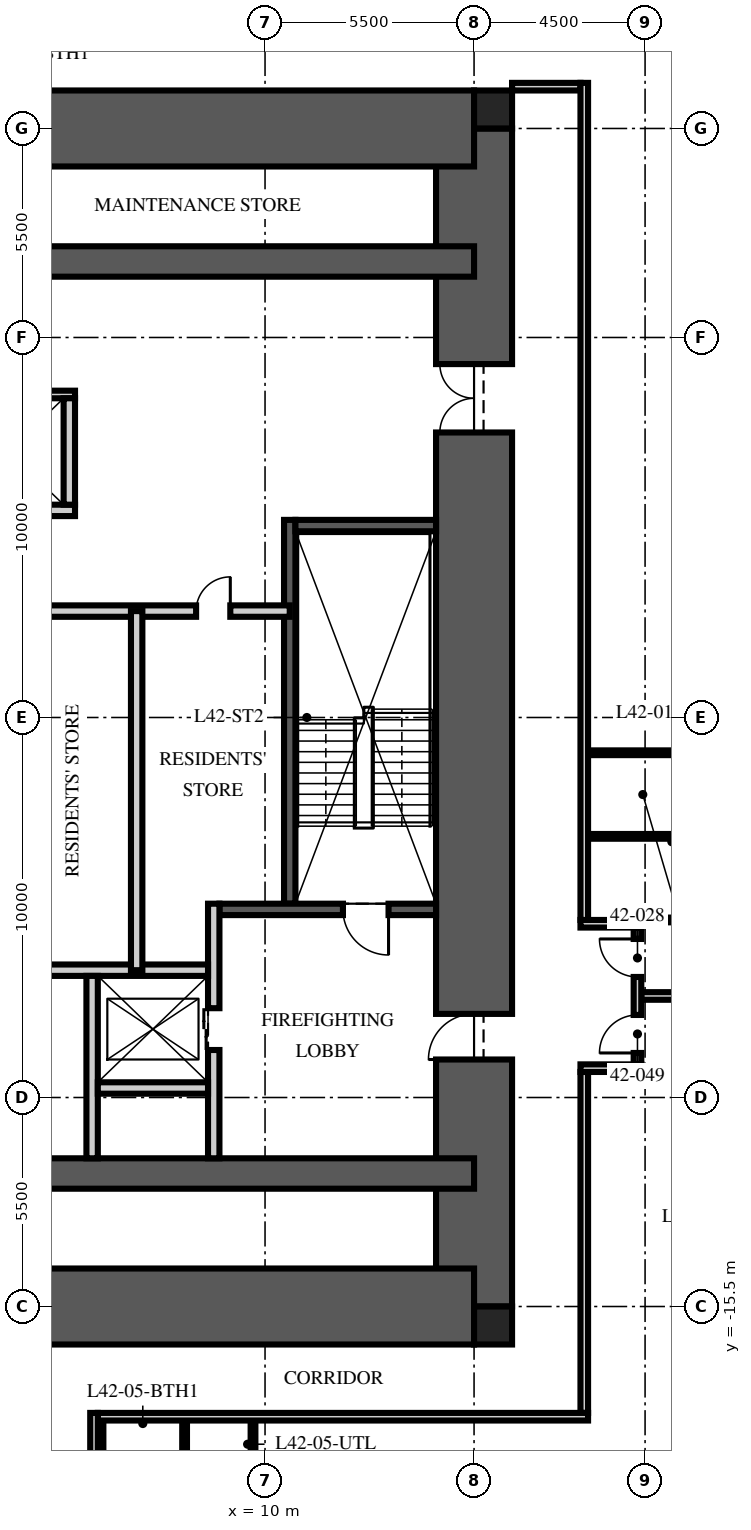
"""IFC4 building model, lengths in metres.
Left out: names, types, materials, properties, quantities, classifications, styles, units other than length and angle.
Written with IfcOpenShell. Run it as: python <this file> out.ifc"""

import sys

from ifc_helpers import new_model, si_unit, direction, frame, frame_2d, origin, origin_2d, place, context, subcontext, project, spatial, rectangle, extrude, element, fill, save


model = new_model("IFC4")
c1 = context("Model", 3, precision=1e-05, world=origin(), true_north=direction((0.0, 1.0)))
c2 = subcontext(c1, "Body", "Model", "MODEL_VIEW")
j1 = project(units=[si_unit("LENGTHUNIT", "METRE"), si_unit("PLANEANGLEUNIT", "RADIAN")], contexts=[c1])
p1 = place(None, origin())
s1 = spatial("IfcSite", under=j1, at=p1, CompositionType="ELEMENT")
p2 = place(p1, origin())
s2 = spatial("IfcBuilding", under=s1, at=p2, CompositionType="ELEMENT")
p3 = place(p2, frame((0.0, 0.0, 167.25)))
s3 = spatial("IfcBuildingStorey", under=s2, at=p3, CompositionType="ELEMENT", Elevation=167.25)
p4 = place(p3, frame((15.5, -15.5, -0.25), z_axis=(0.0, 0.0, 1.0), x_axis=(0.0, 1.0, 0.0)))
e1 = element("IfcWall", 1, at=p4, inside=s3, PredefinedType="SHEAR", context=c2, shape_type="SweptSolid", body=[
    extrude(rectangle(XDim=31.0, YDim=2.0, at=frame_2d((15.5, 0.0))), origin(), (0.0, 0.0, 1.0), 3.75),
])
p5 = place(p4, frame((6.5, 0.0, 0.25)))
e2 = element("IfcOpeningElement", 2, at=p5, cuts=e1, PredefinedType="OPENING", context=c2, shape_type="SweptSolid", body=[
    extrude(rectangle(XDim=1.2, YDim=2.1, at=frame_2d((0.6, 1.05))), frame((0.0, 1.01, 0.0), z_axis=(0.0, -1.0, 0.0), x_axis=(1.0, 0.0, 0.0)), (0.0, 0.0, 1.0), 2.02),
])
p6 = place(p4, frame((23.0, 0.0, 0.25)))
e3 = element("IfcOpeningElement", 3, at=p6, cuts=e1, PredefinedType="OPENING", context=c2, shape_type="SweptSolid", body=[
    extrude(rectangle(XDim=1.8, YDim=2.1, at=frame_2d((0.9, 1.05))), frame((0.0, 1.01, 0.0), z_axis=(0.0, -1.0, 0.0), x_axis=(1.0, 0.0, 0.0)), (0.0, 0.0, 1.0), 2.02),
])
p7 = place(p3, frame((-15.5, 15.5, -0.25), z_axis=(0.0, 0.0, 1.0), x_axis=(1.0, 0.0, 0.0)))
e4 = element("IfcWall", 4, at=p7, inside=s3, PredefinedType="SHEAR", context=c2, shape_type="SweptSolid", body=[
    extrude(rectangle(XDim=31.0, YDim=2.0, at=frame_2d((15.5, 0.0))), origin(), (0.0, 0.0, 1.0), 3.75),
])
p8 = place(p7, frame((5.0, 0.0, 0.25)))
e5 = element("IfcOpeningElement", 5, at=p8, cuts=e4, PredefinedType="OPENING", context=c2, shape_type="SweptSolid", body=[
    extrude(rectangle(XDim=1.0, YDim=2.1, at=frame_2d((0.5, 1.05))), frame((0.0, 1.01, 0.0), z_axis=(0.0, -1.0, 0.0), x_axis=(1.0, 0.0, 0.0)), (0.0, 0.0, 1.0), 2.02),
])
p9 = place(p3, frame((-15.5, -15.5, -0.25), z_axis=(0.0, 0.0, 1.0), x_axis=(1.0, 0.0, 0.0)))
e6 = element("IfcWall", 6, at=p9, inside=s3, PredefinedType="SHEAR", context=c2, shape_type="SweptSolid", body=[
    extrude(rectangle(XDim=31.0, YDim=2.0, at=frame_2d((15.5, 0.0))), origin(), (0.0, 0.0, 1.0), 3.75),
])
p10 = place(p9, frame((10.4, 0.0, 0.25)))
e7 = element("IfcOpeningElement", 7, at=p10, cuts=e6, PredefinedType="OPENING", context=c2, shape_type="SweptSolid", body=[
    extrude(rectangle(XDim=1.1, YDim=2.1, at=frame_2d((0.55, 1.05))), frame((0.0, 1.01, 0.0), z_axis=(0.0, -1.0, 0.0), x_axis=(1.0, 0.0, 0.0)), (0.0, 0.0, 1.0), 2.02),
])
p11 = place(p9, frame((13.5, 0.0, 0.25)))
e8 = element("IfcOpeningElement", 8, at=p11, cuts=e6, PredefinedType="OPENING", context=c2, shape_type="SweptSolid", body=[
    extrude(rectangle(XDim=1.1, YDim=2.1, at=frame_2d((0.55, 1.05))), frame((0.0, 1.01, 0.0), z_axis=(0.0, -1.0, 0.0), x_axis=(1.0, 0.0, 0.0)), (0.0, 0.0, 1.0), 2.02),
])
p12 = place(p9, frame((16.6, 0.0, 0.25)))
e9 = element("IfcOpeningElement", 9, at=p12, cuts=e6, PredefinedType="OPENING", context=c2, shape_type="SweptSolid", body=[
    extrude(rectangle(XDim=1.1, YDim=2.1, at=frame_2d((0.55, 1.05))), frame((0.0, 1.01, 0.0), z_axis=(0.0, -1.0, 0.0), x_axis=(1.0, 0.0, 0.0)), (0.0, 0.0, 1.0), 2.02),
])
for number, where, z_axis, x_axis in (
    (10, (-15.5, 12.0, -0.25), (0.0, 0.0, 1.0), (1.0, 0.0, 0.0)),
    (11, (-15.5, -12.0, -0.25), (0.0, 0.0, 1.0), (1.0, 0.0, 0.0)),
):
    element("IfcWall", number, at=place(p3, frame(where, z_axis=z_axis, x_axis=x_axis)), inside=s3, PredefinedType="SHEAR", context=c2, shape_type="SweptSolid", body=[
        extrude(rectangle(XDim=31.0, YDim=0.8, at=frame_2d((15.5, 0.0))), origin(), (0.0, 0.0, 1.0), 3.75),
    ])
for number, where, z_axis, x_axis in (
    (12, (16.0, 16.0, -0.25), (0.0, 0.0, 1.0), (1.0, 0.0, 0.0)),
    (13, (16.0, -16.0, -0.25), (0.0, 0.0, 1.0), (1.0, 0.0, 0.0)),
):
    element("IfcColumn", number, at=place(p3, frame(where, z_axis=z_axis, x_axis=x_axis)), inside=s3, PredefinedType="COLUMN", context=c2, shape_type="SweptSolid", body=[
        extrude(rectangle(XDim=1.0, YDim=1.0, at=origin_2d()), origin(), (0.0, 0.0, 1.0), 3.75),
    ])
p13 = place(p3, frame((10.65, -4.9, 0.0), z_axis=(0.0, 0.0, 1.0), x_axis=(0.0, 1.0, 0.0)))
e14 = element("IfcWall", 14, at=p13, inside=s3, PredefinedType="SOLIDWALL", context=c2, shape_type="SweptSolid", body=[
    extrude(rectangle(XDim=10.1, YDim=0.3, at=frame_2d((5.05, 0.0))), origin(), (0.0, 0.0, 1.0), 3.5),
])
p14 = place(p3, frame((14.5, -5.05, 0.0), z_axis=(0.0, 0.0, 1.0), x_axis=(-1.0, 0.0, 0.0)))
e15 = element("IfcWall", 15, at=p14, inside=s3, PredefinedType="SOLIDWALL", context=c2, shape_type="SweptSolid", body=[
    extrude(rectangle(XDim=5.7, YDim=0.3, at=frame_2d((2.85, 0.0))), origin(), (0.0, 0.0, 1.0), 3.5),
])
p15 = place(p14, frame((1.25, 0.0, 0.0)))
e16 = element("IfcOpeningElement", 16, at=p15, cuts=e15, PredefinedType="OPENING", context=c2, shape_type="SweptSolid", body=[
    extrude(rectangle(XDim=1.2, YDim=2.1, at=frame_2d((0.6, 1.05))), frame((0.0, 0.16, 0.0), z_axis=(0.0, -1.0, 0.0), x_axis=(1.0, 0.0, 0.0)), (0.0, 0.0, 1.0), 0.32),
])
p16 = place(p3, frame((14.5, 5.05, 0.0), z_axis=(0.0, 0.0, 1.0), x_axis=(-1.0, 0.0, 0.0)))
e17 = element("IfcWall", 17, at=p16, inside=s3, PredefinedType="SOLIDWALL", context=c2, shape_type="SweptSolid", body=[
    extrude(rectangle(XDim=3.7, YDim=0.3, at=frame_2d((1.85, 0.0))), origin(), (0.0, 0.0, 1.0), 3.5),
])
p17 = place(p3, frame((8.65, -11.6, 0.0), z_axis=(0.0, 0.0, 1.0), x_axis=(0.0, 1.0, 0.0)))
e18 = element("IfcWall", 18, at=p17, inside=s3, PredefinedType="PARTITIONING", context=c2, shape_type="SweptSolid", body=[
    extrude(rectangle(XDim=6.7, YDim=0.3, at=frame_2d((3.35, 0.0))), origin(), (0.0, 0.0, 1.0), 3.5),
])
p18 = place(p17, frame((2.85, 0.0, 0.0)))
e19 = element("IfcOpeningElement", 19, at=p18, cuts=e18, PredefinedType="OPENING", context=c2, shape_type="SweptSolid", body=[
    extrude(rectangle(XDim=1.1, YDim=2.1, at=frame_2d((0.55, 1.05))), frame((0.0, 0.16, 0.0), z_axis=(0.0, -1.0, 0.0), x_axis=(1.0, 0.0, 0.0)), (0.0, 0.0, 1.0), 0.32),
])
p19 = place(p3, frame((-8.5, -6.65, 0.0), z_axis=(0.0, 0.0, 1.0), x_axis=(1.0, 0.0, 0.0)))
e20 = element("IfcWall", 20, at=p19, inside=s3, PredefinedType="PARTITIONING", context=c2, shape_type="SweptSolid", body=[
    extrude(rectangle(XDim=17.0, YDim=0.3, at=frame_2d((8.5, 0.0))), origin(), (0.0, 0.0, 1.0), 3.5),
])
p20 = place(p19, frame((7.8, 0.0, 0.0)))
e21 = element("IfcOpeningElement", 21, at=p20, cuts=e20, PredefinedType="OPENING", context=c2, shape_type="SweptSolid", body=[
    extrude(rectangle(XDim=1.3, YDim=2.4, at=frame_2d((0.65, 1.2))), frame((0.0, 0.16, 0.0), z_axis=(0.0, -1.0, 0.0), x_axis=(1.0, 0.0, 0.0)), (0.0, 0.0, 1.0), 0.32),
])
p21 = place(p19, frame((5.65, 0.0, 0.0)))
e22 = element("IfcOpeningElement", 22, at=p21, cuts=e20, PredefinedType="OPENING", context=c2, shape_type="SweptSolid", body=[
    extrude(rectangle(XDim=0.9, YDim=2.1, at=frame_2d((0.45, 1.05))), frame((0.0, 0.16, 0.0), z_axis=(0.0, -1.0, 0.0), x_axis=(1.0, 0.0, 0.0)), (0.0, 0.0, 1.0), 0.32),
])
p22 = place(p19, frame((10.4, 0.0, 0.0)))
e23 = element("IfcOpeningElement", 23, at=p22, cuts=e20, PredefinedType="OPENING", context=c2, shape_type="SweptSolid", body=[
    extrude(rectangle(XDim=0.9, YDim=2.1, at=frame_2d((0.45, 1.05))), frame((0.0, 0.16, 0.0), z_axis=(0.0, -1.0, 0.0), x_axis=(1.0, 0.0, 0.0)), (0.0, 0.0, 1.0), 0.32),
])
p23 = place(p3, frame((5.45, -11.6, 0.0), z_axis=(0.0, 0.0, 1.0), x_axis=(0.0, 1.0, 0.0)))
e24 = element("IfcWall", 24, at=p23, inside=s3, PredefinedType="PARTITIONING", context=c2, shape_type="SweptSolid", body=[
    extrude(rectangle(XDim=4.8, YDim=0.3, at=frame_2d((2.4, 0.0))), origin(), (0.0, 0.0, 1.0), 3.5),
])
p24 = place(p3, frame((5.6, -9.75, 0.0), z_axis=(0.0, 0.0, 1.0), x_axis=(1.0, 0.0, 0.0)))
e25 = element("IfcWall", 25, at=p24, inside=s3, PredefinedType="PARTITIONING", context=c2, shape_type="SweptSolid", body=[
    extrude(rectangle(XDim=2.9, YDim=0.3, at=frame_2d((1.45, 0.0))), origin(), (0.0, 0.0, 1.0), 3.5),
])
p25 = place(p3, frame((-4.7, 5.45, 0.0), z_axis=(0.0, 0.0, 1.0), x_axis=(1.0, 0.0, 0.0)))
e26 = element("IfcWall", 26, at=p25, inside=s3, PredefinedType="PARTITIONING", context=c2, shape_type="SweptSolid", body=[
    extrude(rectangle(XDim=9.7, YDim=0.3, at=frame_2d((4.85, 0.0))), origin(), (0.0, 0.0, 1.0), 3.5),
])
p26 = place(p3, frame((-4.7, 8.5, 0.0), z_axis=(0.0, 0.0, 1.0), x_axis=(1.0, 0.0, 0.0)))
e27 = element("IfcWall", 27, at=p26, inside=s3, PredefinedType="PARTITIONING", context=c2, shape_type="SweptSolid", body=[
    extrude(rectangle(XDim=9.7, YDim=0.2, at=frame_2d((4.85, 0.0))), origin(), (0.0, 0.0, 1.0), 3.5),
])
p27 = place(p3, frame((4.85, 5.6, 0.0), z_axis=(0.0, 0.0, 1.0), x_axis=(0.0, 1.0, 0.0)))
e28 = element("IfcWall", 28, at=p27, inside=s3, PredefinedType="PARTITIONING", context=c2, shape_type="SweptSolid", body=[
    extrude(rectangle(XDim=2.8, YDim=0.3, at=frame_2d((1.4, 0.0))), origin(), (0.0, 0.0, 1.0), 3.5),
])
p28 = place(p3, frame((-10.65, 2.8, 0.0), z_axis=(0.0, 0.0, 1.0), x_axis=(1.0, 0.0, 0.0)))
e29 = element("IfcWall", 29, at=p28, inside=s3, PredefinedType="PARTITIONING", context=c2, shape_type="SweptSolid", body=[
    extrude(rectangle(XDim=21.3, YDim=0.3, at=frame_2d((10.65, 0.0))), origin(), (0.0, 0.0, 1.0), 3.5),
])
p29 = place(p28, frame((10.05, 0.0, 0.0)))
e30 = element("IfcOpeningElement", 30, at=p29, cuts=e29, PredefinedType="OPENING", context=c2, shape_type="SweptSolid", body=[
    extrude(rectangle(XDim=1.2, YDim=2.1, at=frame_2d((0.6, 1.05))), frame((0.0, 0.16, 0.0), z_axis=(0.0, -1.0, 0.0), x_axis=(1.0, 0.0, 0.0)), (0.0, 0.0, 1.0), 0.32),
])
p30 = place(p28, frame((1.493, 0.0, 0.0)))
e31 = element("IfcOpeningElement", 31, at=p30, cuts=e29, PredefinedType="OPENING", context=c2, shape_type="SweptSolid", body=[
    extrude(rectangle(XDim=0.9, YDim=2.1, at=frame_2d((0.45, 1.05))), frame((0.0, 0.16, 0.0), z_axis=(0.0, -1.0, 0.0), x_axis=(1.0, 0.0, 0.0)), (0.0, 0.0, 1.0), 0.32),
])
p31 = place(p28, frame((18.836, 0.0, 0.0)))
e32 = element("IfcOpeningElement", 32, at=p31, cuts=e29, PredefinedType="OPENING", context=c2, shape_type="SweptSolid", body=[
    extrude(rectangle(XDim=0.9, YDim=2.1, at=frame_2d((0.45, 1.05))), frame((0.0, 0.16, 0.0), z_axis=(0.0, -1.0, 0.0), x_axis=(1.0, 0.0, 0.0)), (0.0, 0.0, 1.0), 0.32),
])
p32 = place(p3, frame((6.622, -6.65, 0.0), z_axis=(0.0, 0.0, 1.0), x_axis=(0.0, 1.0, 0.0)))
e33 = element("IfcWall", 33, at=p32, inside=s3, PredefinedType="PARTITIONING", context=c2, shape_type="SweptSolid", body=[
    extrude(rectangle(XDim=9.45, YDim=0.3, at=frame_2d((4.725, 0.0))), origin(), (0.0, 0.0, 1.0), 3.5),
])
p33 = place(p3, frame((16.5, 16.6, 0.0), z_axis=(0.0, 0.0, 1.0), x_axis=(1.0, 0.0, 0.0)))
e34 = element("IfcWall", 34, at=p33, inside=s3, PredefinedType="PARTITIONING", context=c2, shape_type="SweptSolid", body=[
    extrude(rectangle(XDim=1.8, YDim=0.2, at=frame_2d((0.9, 0.0))), origin(), (0.0, 0.0, 1.0), 2.3),
])
p34 = place(p3, frame((19.9, -7.328, 0.0), z_axis=(0.0, 0.0, 1.0), x_axis=(1.0, 0.0, 0.0)))
e35 = element("IfcWall", 35, at=p34, inside=s3, PredefinedType="PARTITIONING", context=c2, shape_type="SweptSolid", body=[
    extrude(rectangle(XDim=8.5, YDim=0.2, at=frame_2d((4.25, 0.0))), origin(), (0.0, 0.0, 1.0), 2.81),
])
p35 = place(p3, frame((19.97, -5.328, 0.0), z_axis=(0.0, 0.0, 1.0), x_axis=(1.0, 0.0, 0.0)))
e36 = element("IfcWall", 36, at=p35, inside=s3, PredefinedType="PARTITIONING", context=c2, shape_type="SweptSolid", body=[
    extrude(rectangle(XDim=2.31, YDim=0.125, at=frame_2d((1.155, 0.0))), origin(), (0.0, 0.0, 1.0), 3.5),
])
for number, where, z_axis, x_axis in (
    (37, (18.5, -3.128, 0.0), (0.0, 0.0, 1.0), (1.0, 0.0, 0.0)),
    (38, (18.5, -0.928, 0.0), (0.0, 0.0, 1.0), (1.0, 0.0, 0.0)),
):
    element("IfcWall", number, at=place(p3, frame(where, z_axis=z_axis, x_axis=x_axis)), inside=s3, PredefinedType="PARTITIONING", context=c2, shape_type="SweptSolid", body=[
        extrude(rectangle(XDim=3.78, YDim=0.125, at=frame_2d((1.89, 0.0))), origin(), (0.0, 0.0, 1.0), 3.5),
    ])
for number, where, z_axis, x_axis in (
    (39, (5.684, -18.5, 0.0), (0.0, 0.0, 1.0), (0.0, -1.0, 0.0)),
    (40, (7.884, -18.5, 0.0), (0.0, 0.0, 1.0), (0.0, -1.0, 0.0)),
    (41, (9.684, -18.5, 0.0), (0.0, 0.0, 1.0), (0.0, -1.0, 0.0)),
):
    element("IfcWall", number, at=place(p3, frame(where, z_axis=z_axis, x_axis=x_axis)), inside=s3, PredefinedType="PARTITIONING", context=c2, shape_type="SweptSolid", body=[
        extrude(rectangle(XDim=4.2, YDim=0.125, at=frame_2d((2.1, 0.0))), origin(), (0.0, 0.0, 1.0), 3.5),
    ])
p36 = place(p3, frame((18.4, -18.3, 0.0), z_axis=(0.0, 0.0, 1.0), x_axis=(0.0, 1.0, 0.0)))
e42 = element("IfcWall", 42, at=p36, inside=s3, PredefinedType="PARTITIONING", context=c2, shape_type="SweptSolid", body=[
    extrude(rectangle(XDim=8.972, YDim=0.2, at=frame_2d((4.486, 0.0))), origin(), (0.0, 0.0, 1.0), 2.3),
])
p37 = place(p3, frame((18.3, -9.228, 0.0), z_axis=(0.0, 0.0, 1.0), x_axis=(1.0, 0.0, 0.0)))
e43 = element("IfcWall", 43, at=p37, inside=s3, PredefinedType="PARTITIONING", context=c2, shape_type="SweptSolid", body=[
    extrude(rectangle(XDim=1.6, YDim=0.2, at=frame_2d((0.8, 0.0))), origin(), (0.0, 0.0, 1.0), 2.7),
])
p38 = place(p3, frame((18.3, -5.428, 0.0), z_axis=(0.0, 0.0, 1.0), x_axis=(1.0, 0.0, 0.0)))
e44 = element("IfcWall", 44, at=p38, inside=s3, PredefinedType="PARTITIONING", context=c2, shape_type="SweptSolid", body=[
    extrude(rectangle(XDim=1.6, YDim=0.2, at=frame_2d((0.8, 0.0))), origin(), (0.0, 0.0, 1.0), 3.5),
])
p39 = place(p3, frame((19.8, -9.128, 0.0), z_axis=(0.0, 0.0, 1.0), x_axis=(0.0, 1.0, 0.0)))
e45 = element("IfcWall", 45, at=p39, inside=s3, PredefinedType="PARTITIONING", context=c2, shape_type="SweptSolid", body=[
    extrude(rectangle(XDim=3.6, YDim=0.2, at=frame_2d((1.8, 0.0))), origin(), (0.0, 0.0, 1.0), 2.7),
])
p40 = place(p39, frame((2.3, 0.0, 0.0)))
e46 = element("IfcOpeningElement", 46, at=p40, cuts=e45, PredefinedType="OPENING", context=c2, shape_type="SweptSolid", body=[
    extrude(rectangle(XDim=1.0, YDim=2.2, at=frame_2d((0.5, 1.1))), frame((0.0, 0.11, 0.0), z_axis=(0.0, -1.0, 0.0), x_axis=(1.0, 0.0, 0.0)), (0.0, 0.0, 1.0), 0.22),
])
p41 = place(p39, frame((0.3, 0.0, 0.0)))
e47 = element("IfcOpeningElement", 47, at=p41, cuts=e45, PredefinedType="OPENING", context=c2, shape_type="SweptSolid", body=[
    extrude(rectangle(XDim=1.0, YDim=2.2, at=frame_2d((0.5, 1.1))), frame((0.0, 0.11, 0.0), z_axis=(0.0, -1.0, 0.0), x_axis=(1.0, 0.0, 0.0)), (0.0, 0.0, 1.0), 0.22),
])
p42 = place(p3, frame((18.4, -5.328, 0.0), z_axis=(0.0, 0.0, 1.0), x_axis=(0.0, 1.0, 0.0)))
e48 = element("IfcWall", 48, at=p42, inside=s3, PredefinedType="PARTITIONING", context=c2, shape_type="SweptSolid", body=[
    extrude(rectangle(XDim=22.028, YDim=0.2, at=frame_2d((11.014, 0.0))), origin(), (0.0, 0.0, 1.0), 2.7),
])
p43 = place(p3, frame((18.5, -18.4, 0.0), z_axis=(0.0, 0.0, 1.0), x_axis=(-1.0, 0.0, 0.0)))
e49 = element("IfcWall", 49, at=p43, inside=s3, PredefinedType="PARTITIONING", context=c2, shape_type="SweptSolid", body=[
    extrude(rectangle(XDim=12.9, YDim=0.2, at=frame_2d((6.45, 0.0))), origin(), (0.0, 0.0, 1.0), 2.3),
])
p44 = place(p3, frame((5.5, -18.3, 0.0), z_axis=(0.0, 0.0, 1.0), x_axis=(0.0, -1.0, 0.0)))
e50 = element("IfcWall", 50, at=p44, inside=s3, PredefinedType="PARTITIONING", context=c2, shape_type="SweptSolid", body=[
    extrude(rectangle(XDim=3.0, YDim=0.2, at=frame_2d((1.5, 0.0))), origin(), (0.0, 0.0, 1.0), 3.5),
])
p45 = place(p15, origin())
e51 = element("IfcDoor", 51, at=p45, inside=s3, OperationType="SINGLE_SWING_LEFT", PredefinedType="DOOR", context=c2, shape_type="SweptSolid", body=[
    extrude(rectangle(XDim=1.2, YDim=2.1, at=frame_2d((0.6, 1.05))), frame((0.0, 0.025, 0.0), z_axis=(0.0, -1.0, 0.0), x_axis=(1.0, 0.0, 0.0)), (0.0, 0.0, 1.0), 0.05),
])
fill(e16, e51)
p46 = place(p5, origin())
e52 = element("IfcDoor", 52, at=p46, inside=s3, OperationType="SINGLE_SWING_LEFT", PredefinedType="DOOR", context=c2, shape_type="SweptSolid", body=[
    extrude(rectangle(XDim=1.2, YDim=2.1, at=frame_2d((0.6, 1.05))), frame((0.0, 0.025, 0.0), z_axis=(0.0, -1.0, 0.0), x_axis=(1.0, 0.0, 0.0)), (0.0, 0.0, 1.0), 0.05),
])
fill(e2, e52)
p47 = place(p6, origin())
e53 = element("IfcDoor", 53, at=p47, inside=s3, OperationType="DOUBLE_DOOR_SINGLE_SWING", PredefinedType="DOOR", context=c2, shape_type="SweptSolid", body=[
    extrude(rectangle(XDim=1.8, YDim=2.1, at=frame_2d((0.9, 1.05))), frame((0.0, 0.025, 0.0), z_axis=(0.0, -1.0, 0.0), x_axis=(1.0, 0.0, 0.0)), (0.0, 0.0, 1.0), 0.05),
])
fill(e3, e53)
p48 = place(p18, origin())
e54 = element("IfcDoor", 54, at=p48, inside=s3, OperationType="DOUBLE_DOOR_SLIDING", PredefinedType="DOOR", context=c2, shape_type="SweptSolid", body=[
    extrude(rectangle(XDim=1.1, YDim=2.1, at=frame_2d((0.55, 1.05))), frame((0.0, 0.025, 0.0), z_axis=(0.0, -1.0, 0.0), x_axis=(1.0, 0.0, 0.0)), (0.0, 0.0, 1.0), 0.05),
])
fill(e19, e54)
p49 = place(p31, origin())
e55 = element("IfcDoor", 55, at=p49, inside=s3, OperationType="SINGLE_SWING_RIGHT", PredefinedType="DOOR", context=c2, shape_type="SweptSolid", body=[
    extrude(rectangle(XDim=0.9, YDim=2.1, at=frame_2d((0.45, 1.05))), frame((0.0, 0.025, 0.0), z_axis=(0.0, -1.0, 0.0), x_axis=(1.0, 0.0, 0.0)), (0.0, 0.0, 1.0), 0.05),
])
fill(e32, e55)
p50 = place(p40, origin())
e56 = element("IfcDoor", 56, at=p50, inside=s3, OperationType="SINGLE_SWING_RIGHT", PredefinedType="DOOR", context=c2, shape_type="SweptSolid", body=[
    extrude(rectangle(XDim=1.0, YDim=2.2, at=frame_2d((0.5, 1.1))), frame((0.0, 0.025, 0.0), z_axis=(0.0, -1.0, 0.0), x_axis=(1.0, 0.0, 0.0)), (0.0, 0.0, 1.0), 0.05),
])
fill(e46, e56)
p51 = place(p41, origin())
e57 = element("IfcDoor", 57, at=p51, inside=s3, OperationType="SINGLE_SWING_LEFT", PredefinedType="DOOR", context=c2, shape_type="SweptSolid", body=[
    extrude(rectangle(XDim=1.0, YDim=2.2, at=frame_2d((0.5, 1.1))), frame((0.0, 0.025, 0.0), z_axis=(0.0, -1.0, 0.0), x_axis=(1.0, 0.0, 0.0)), (0.0, 0.0, 1.0), 0.05),
])
fill(e47, e57)
save(model, sys.argv[1])
